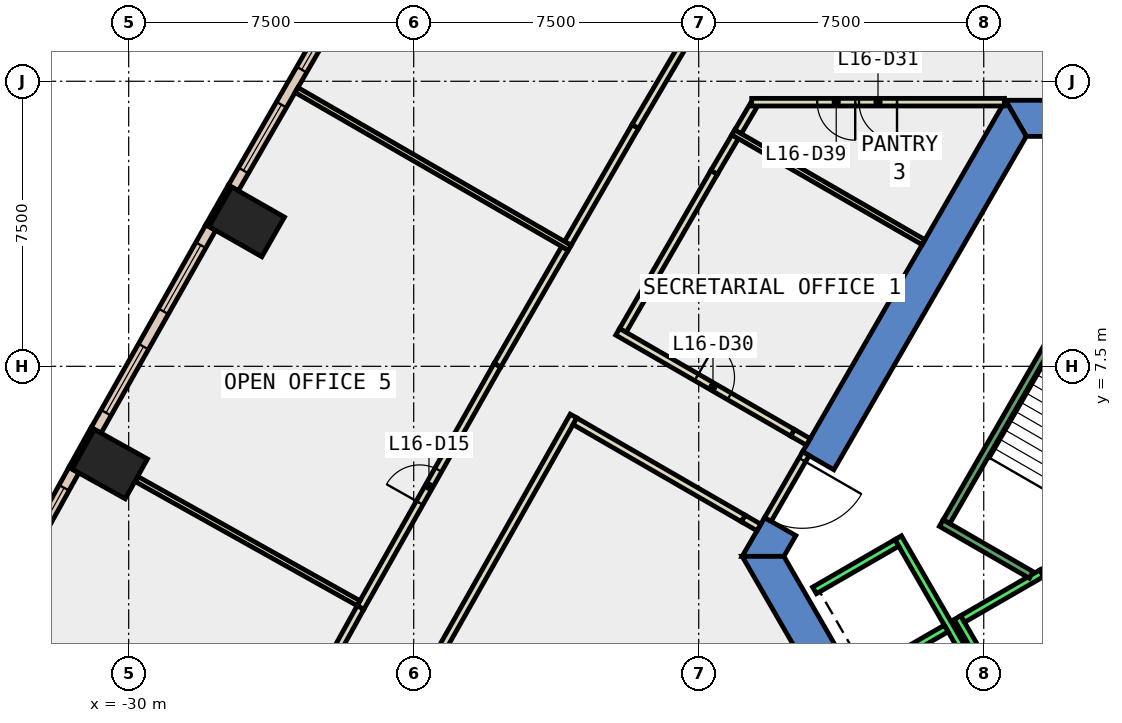
"""IFC4 building model, lengths in metres.
Left out: names, types, materials, properties, quantities, classifications, styles, units other than length and angle.
Written with IfcOpenShell. Run it as: python <this file> out.ifc"""

import sys

from ifc_helpers import new_model, si_unit, direction, frame, frame_2d, origin, origin_2d, place, context, subcontext, project, spatial, polyline, rectangle, outline, extrude, element, fill, save


model = new_model("IFC4")
c1 = context("Model", 3, precision=1e-05, world=origin(), true_north=direction((0.0, 1.0)))
c2 = subcontext(c1, "Body", "Model", "MODEL_VIEW")
j1 = project(units=[si_unit("LENGTHUNIT", "METRE"), si_unit("PLANEANGLEUNIT", "RADIAN")], contexts=[c1])
p1 = place(None, origin())
s1 = spatial("IfcSite", under=j1, at=p1, CompositionType="ELEMENT")
p2 = place(p1, origin())
s2 = spatial("IfcBuilding", under=s1, at=p2, CompositionType="ELEMENT")
p3 = place(p2, frame((0.0, 0.0, 77.0)))
s3 = spatial("IfcBuildingStorey", under=s2, at=p3, CompositionType="ELEMENT", Elevation=77.0)
for number, where, z_axis, x_axis in (
    (1, (-26.894, 11.301, -0.4), (0.0, 0.0, 1.0), (0.496, 0.869, 0.0)),
    (2, (-30.497, 4.928, -0.4), (0.0, 0.0, 1.0), (0.487, 0.873, 0.0)),
):
    element("IfcColumn", number, at=place(p3, frame(where, z_axis=z_axis, x_axis=x_axis)), inside=s3, PredefinedType="COLUMN", context=c2, shape_type="SweptSolid", body=[
        extrude(rectangle(XDim=1.2, YDim=1.6, at=origin_2d()), origin(), (0.0, 0.0, 1.0), 4.0),
    ])
p4 = place(p3, frame((0.0, 0.0, -0.4)))
e3 = element("IfcWall", 3, at=p4, inside=s3, PredefinedType="SHEAR", context=c2, shape_type="SweptSolid", body=[
    extrude(outline(polyline([(-4.55, 13.55), (-4.55, 14.5), (-6.928, 14.5), (-6.38, 13.55), (-4.55, 13.55)])), origin(), (0.0, 0.0, 1.0), 4.0),
])
p5 = place(p3, frame((0.0, 0.0, -0.4)))
e4 = element("IfcWall", 4, at=p5, inside=s3, PredefinedType="SHEAR", context=c2, shape_type="SweptSolid", body=[
    extrude(outline(polyline([(-12.267, 5.252), (-11.444, 4.777), (-6.38, 13.55), (-6.928, 14.5), (-12.267, 5.252)])), origin(), (0.0, 0.0, 1.0), 4.0),
])
p6 = place(p3, frame((0.0, 0.0, -0.4)))
e5 = element("IfcWall", 5, at=p6, inside=s3, PredefinedType="SHEAR", context=c2, shape_type="SweptSolid", body=[
    extrude(outline(polyline([(-12.444, 3.045), (-13.267, 3.52), (-13.856, 2.5), (-12.759, 2.5), (-12.444, 3.045)])), origin(), (0.0, 0.0, 1.0), 4.0),
])
p7 = place(p3, frame((0.0, 0.0, -0.4)))
e6 = element("IfcWall", 6, at=p7, inside=s3, PredefinedType="SHEAR", context=c2, shape_type="SweptSolid", body=[
    extrude(outline(polyline([(-13.856, 2.5), (-6.928, -9.5), (-6.38, -8.55), (-12.759, 2.5), (-13.856, 2.5)])), origin(), (0.0, 0.0, 1.0), 4.0),
])
p8 = place(p3, frame((-27.335, 12.243, 0.0), z_axis=(0.0, 0.0, 1.0), x_axis=(-0.495854054996, -0.868405870629, 0.0)))
e7 = element("IfcWall", 7, at=p8, inside=s3, PredefinedType="STANDARD", context=c2, shape_type="SweptSolid", body=[
    extrude(rectangle(XDim=1.2, YDim=0.1, at=frame_2d((0.6, 0.0))), origin(), (0.0, 0.0, 1.0), 3.6),
])
p9 = place(p3, frame((-30.947, 5.866, 0.0), z_axis=(0.0, 0.0, 1.0), x_axis=(-0.486817526853, -0.873503689488, 0.0)))
e8 = element("IfcWall", 8, at=p9, inside=s3, PredefinedType="STANDARD", context=c2, shape_type="SweptSolid", body=[
    extrude(rectangle(XDim=1.2, YDim=0.1, at=frame_2d((0.6, 0.0))), origin(), (0.0, 0.0, 1.0), 3.6),
])
p10 = place(p3, frame((-24.181, 17.5, 0.0), z_axis=(0.0, 0.0, 1.0), x_axis=(-0.499998239139, -0.866026420416, 0.0)))
e9 = element("IfcWall", 9, at=p10, inside=s3, PredefinedType="STANDARD", context=c2, shape_type="SweptSolid", body=[
    extrude(rectangle(XDim=6.13, YDim=0.3, at=frame_2d((3.065, 0.0))), origin(), (0.0, 0.0, 1.0), 3.6),
])
p11 = place(p10, frame((0.533, 0.0, 0.9)))
e10 = element("IfcOpeningElement", 10, at=p11, cuts=e9, PredefinedType="OPENING", context=c2, shape_type="SweptSolid", body=[
    extrude(rectangle(XDim=2.0, YDim=2.6, at=frame_2d((1.0, 1.3))), frame((0.0, 0.16, 0.0), z_axis=(0.0, -1.0, 0.0), x_axis=(1.0, 0.0, 0.0)), (0.0, 0.0, 1.0), 0.32),
])
p12 = place(p10, frame((3.598, 0.0, 0.9)))
e11 = element("IfcOpeningElement", 11, at=p12, cuts=e9, PredefinedType="OPENING", context=c2, shape_type="SweptSolid", body=[
    extrude(rectangle(XDim=2.0, YDim=2.6, at=frame_2d((1.0, 1.3))), frame((0.0, 0.16, 0.0), z_axis=(0.0, -1.0, 0.0), x_axis=(1.0, 0.0, 0.0)), (0.0, 0.0, 1.0), 0.32),
])
p13 = place(p3, frame((-27.84, 11.151, 0.0), z_axis=(0.0, 0.0, 1.0), x_axis=(-0.492097935349, -0.870539845168, 0.0)))
e12 = element("IfcWall", 12, at=p13, inside=s3, PredefinedType="STANDARD", context=c2, shape_type="SweptSolid", body=[
    extrude(rectangle(XDim=6.131, YDim=0.3, at=frame_2d((3.065, 0.0))), origin(), (0.0, 0.0, 1.0), 3.6),
])
p14 = place(p13, frame((0.533, 0.0, 0.9)))
e13 = element("IfcOpeningElement", 13, at=p14, cuts=e12, PredefinedType="OPENING", context=c2, shape_type="SweptSolid", body=[
    extrude(rectangle(XDim=2.0, YDim=2.6, at=frame_2d((1.0, 1.3))), frame((0.0, 0.16, 0.0), z_axis=(0.0, -1.0, 0.0), x_axis=(1.0, 0.0, 0.0)), (0.0, 0.0, 1.0), 0.32),
])
p15 = place(p13, frame((3.598, 0.0, 0.9)))
e14 = element("IfcOpeningElement", 14, at=p15, cuts=e12, PredefinedType="OPENING", context=c2, shape_type="SweptSolid", body=[
    extrude(rectangle(XDim=2.0, YDim=2.6, at=frame_2d((1.0, 1.3))), frame((0.0, 0.16, 0.0), z_axis=(0.0, -1.0, 0.0), x_axis=(1.0, 0.0, 0.0)), (0.0, 0.0, 1.0), 0.32),
])
p16 = place(p3, frame((-31.442, 4.769, 0.0), z_axis=(0.0, 0.0, 1.0), x_axis=(-0.484025698618, -0.875053782963, 0.0)))
e15 = element("IfcWall", 15, at=p16, inside=s3, PredefinedType="STANDARD", context=c2, shape_type="SweptSolid", body=[
    extrude(rectangle(XDim=6.13, YDim=0.3, at=frame_2d((3.065, 0.0))), origin(), (0.0, 0.0, 1.0), 3.6),
])
p17 = place(p16, frame((0.532, 0.0, 0.9)))
e16 = element("IfcOpeningElement", 16, at=p17, cuts=e15, PredefinedType="OPENING", context=c2, shape_type="SweptSolid", body=[
    extrude(rectangle(XDim=2.0, YDim=2.6, at=frame_2d((1.0, 1.3))), frame((0.0, 0.16, 0.0), z_axis=(0.0, -1.0, 0.0), x_axis=(1.0, 0.0, 0.0)), (0.0, 0.0, 1.0), 0.32),
])
p18 = place(p16, frame((3.597, 0.0, 0.9)))
e17 = element("IfcOpeningElement", 17, at=p18, cuts=e15, PredefinedType="OPENING", context=c2, shape_type="SweptSolid", body=[
    extrude(rectangle(XDim=2.0, YDim=2.6, at=frame_2d((1.0, 1.3))), frame((0.0, 0.16, 0.0), z_axis=(0.0, -1.0, 0.0), x_axis=(1.0, 0.0, 0.0)), (0.0, 0.0, 1.0), 0.32),
])
p19 = place(p3, frame((-14.042, 13.541, 0.0), z_axis=(0.0, 0.0, 1.0), x_axis=(-0.507733830316, -0.861513991501, 0.0)))
e18 = element("IfcWall", 18, at=p19, inside=s3, PredefinedType="PARTITIONING", context=c2, shape_type="SweptSolid", body=[
    extrude(rectangle(XDim=1.091, YDim=0.2, at=frame_2d((0.545, 0.0))), origin(), (0.0, 0.0, 1.0), 3.6),
])
p20 = place(p3, frame((-14.596, 12.601, 0.0), z_axis=(0.0, 0.0, 1.0), x_axis=(-0.500017431331, -0.866015339567, 0.0)))
e19 = element("IfcWall", 19, at=p20, inside=s3, PredefinedType="PARTITIONING", context=c2, shape_type="SweptSolid", body=[
    extrude(rectangle(XDim=4.8, YDim=0.2, at=frame_2d((2.4, 0.0))), origin(), (0.0, 0.0, 1.0), 3.6),
])
p21 = place(p3, frame((-17.133, 8.408, 0.0), z_axis=(0.0, 0.0, 1.0), x_axis=(0.866005140137, -0.500035096025, 0.0)))
e20 = element("IfcWall", 20, at=p21, inside=s3, PredefinedType="PARTITIONING", context=c2, shape_type="SweptSolid", body=[
    extrude(rectangle(XDim=5.317, YDim=0.2, at=frame_2d((2.659, 0.0))), origin(), (0.0, 0.0, 1.0), 3.6),
])
p22 = place(p21, frame((2.396, 0.0, 0.0)))
e21 = element("IfcOpeningElement", 21, at=p22, cuts=e20, PredefinedType="OPENING", context=c2, shape_type="SweptSolid", body=[
    extrude(rectangle(XDim=1.0, YDim=2.1, at=frame_2d((0.5, 1.05))), frame((0.0, 0.11, 0.0), z_axis=(0.0, -1.0, 0.0), x_axis=(1.0, 0.0, 0.0)), (0.0, 0.0, 1.0), 0.22),
])
p23 = place(p3, frame((-13.557, 14.364, 0.0), z_axis=(0.0, 0.0, 1.0), x_axis=(-0.507840899418, -0.861450881292, 0.0)))
e22 = element("IfcWall", 22, at=p23, inside=s3, PredefinedType="PARTITIONING", context=c2, shape_type="SweptSolid", body=[
    extrude(rectangle(XDim=0.806, YDim=0.2, at=frame_2d((0.403, 0.0))), origin(), (0.0, 0.0, 1.0), 3.6),
])
p24 = place(p3, frame((-13.417, 3.26, 0.0), z_axis=(0.0, 0.0, 1.0), x_axis=(-0.865929261247, 0.500166486798, 0.0)))
e23 = element("IfcWall", 23, at=p24, inside=s3, PredefinedType="PARTITIONING", context=c2, shape_type="SweptSolid", body=[
    extrude(rectangle(XDim=0.476, YDim=0.2, at=frame_2d((0.238, 0.0))), origin(), (0.0, 0.0, 1.0), 2.4),
])
p25 = place(p3, frame((-18.295, 6.192, 0.0), z_axis=(0.0, 0.0, 1.0), x_axis=(-0.492193980341, -0.870485545954, 0.0)))
e24 = element("IfcWall", 24, at=p25, inside=s3, PredefinedType="PARTITIONING", context=c2, shape_type="SweptSolid", body=[
    extrude(rectangle(XDim=7.06, YDim=0.2, at=frame_2d((3.53, 0.0))), origin(), (0.0, 0.0, 1.0), 3.6),
])
p26 = place(p3, frame((-18.445, 10.734, 0.0), z_axis=(0.0, 0.0, 1.0), x_axis=(0.499900903336, 0.866082609711, 0.0)))
e25 = element("IfcWall", 25, at=p26, inside=s3, PredefinedType="PARTITIONING", context=c2, shape_type="SweptSolid", body=[
    extrude(rectangle(XDim=3.553, YDim=0.2, at=frame_2d((1.776, 0.0))), origin(), (0.0, 0.0, 1.0), 3.6),
])
p27 = place(p3, frame((-16.669, 13.811, 0.0), z_axis=(0.0, 0.0, 1.0), x_axis=(0.507777955495, 0.861487984776, 0.0)))
e26 = element("IfcWall", 26, at=p27, inside=s3, PredefinedType="PARTITIONING", context=c2, shape_type="SweptSolid", body=[
    extrude(rectangle(XDim=7.178, YDim=0.2, at=frame_2d((3.589, 0.0))), origin(), (0.0, 0.0, 1.0), 3.6),
])
p28 = place(p27, frame((3.164, 0.0, 0.0)))
e27 = element("IfcOpeningElement", 27, at=p28, cuts=e26, PredefinedType="OPENING", context=c2, shape_type="SweptSolid", body=[
    extrude(rectangle(XDim=1.0, YDim=2.1, at=frame_2d((0.5, 1.05))), frame((0.0, 0.11, 0.0), z_axis=(0.0, -1.0, 0.0), x_axis=(1.0, 0.0, 0.0)), (0.0, 0.0, 1.0), 0.22),
])
p29 = place(p3, frame((-23.901, 1.152, 0.0), z_axis=(0.0, 0.0, 1.0), x_axis=(0.492063845089, 0.870559114797, 0.0)))
e28 = element("IfcWall", 28, at=p29, inside=s3, PredefinedType="PARTITIONING", context=c2, shape_type="SweptSolid", body=[
    extrude(rectangle(XDim=7.326, YDim=0.2, at=frame_2d((3.663, 0.0))), origin(), (0.0, 0.0, 1.0), 3.6),
])
p30 = place(p29, frame((3.163, 0.0, 0.0)))
e29 = element("IfcOpeningElement", 29, at=p30, cuts=e28, PredefinedType="OPENING", context=c2, shape_type="SweptSolid", body=[
    extrude(rectangle(XDim=1.0, YDim=2.1, at=frame_2d((0.5, 1.05))), frame((0.0, 0.11, 0.0), z_axis=(0.0, -1.0, 0.0), x_axis=(1.0, 0.0, 0.0)), (0.0, 0.0, 1.0), 0.22),
])
p31 = place(p3, frame((-20.296, 7.53, 0.0), z_axis=(0.0, 0.0, 1.0), x_axis=(0.500236350306, 0.865888903863, 0.0)))
e30 = element("IfcWall", 30, at=p31, inside=s3, PredefinedType="PARTITIONING", context=c2, shape_type="SweptSolid", body=[
    extrude(rectangle(XDim=3.55, YDim=0.2, at=frame_2d((1.775, 0.0))), origin(), (0.0, 0.0, 1.0), 3.6),
])
p32 = place(p3, frame((-27.375, -5.128, 0.0), z_axis=(0.0, 0.0, 1.0), x_axis=(0.484068035355, 0.875030363558, 0.0)))
e31 = element("IfcWall", 31, at=p32, inside=s3, PredefinedType="PARTITIONING", context=c2, shape_type="SweptSolid", body=[
    extrude(rectangle(XDim=7.177, YDim=0.2, at=frame_2d((3.588, 0.0))), origin(), (0.0, 0.0, 1.0), 3.6),
])
p33 = place(p32, frame((3.163, 0.0, 0.0)))
e32 = element("IfcOpeningElement", 32, at=p33, cuts=e31, PredefinedType="OPENING", context=c2, shape_type="SweptSolid", body=[
    extrude(rectangle(XDim=1.0, YDim=2.1, at=frame_2d((0.5, 1.05))), frame((0.0, 0.11, 0.0), z_axis=(0.0, -1.0, 0.0), x_axis=(1.0, 0.0, 0.0)), (0.0, 0.0, 1.0), 0.22),
])
p34 = place(p3, frame((-14.091, 13.655, 0.0), z_axis=(0.0, 0.0, 1.0), x_axis=(0.866035778077, -0.499982030767, 0.0)))
e33 = element("IfcWall", 33, at=p34, inside=s3, PredefinedType="PARTITIONING", context=c2, shape_type="SweptSolid", body=[
    extrude(rectangle(XDim=5.781, YDim=0.15, at=frame_2d((2.89, 0.0))), origin(), (0.0, 0.0, 1.0), 3.6),
])
p35 = place(p3, frame((-6.957, 14.45, 0.0), z_axis=(0.0, 0.0, 1.0), x_axis=(-1.0, 0.0, 0.0)))
e34 = element("IfcWall", 34, at=p35, inside=s3, PredefinedType="PARTITIONING", context=c2, shape_type="SweptSolid", body=[
    extrude(rectangle(XDim=6.649, YDim=0.2, at=frame_2d((3.324, 0.0))), origin(), (0.0, 0.0, 1.0), 3.6),
])
p36 = place(p35, frame((2.825, 0.0, 0.0)))
e35 = element("IfcOpeningElement", 35, at=p36, cuts=e34, PredefinedType="OPENING", context=c2, shape_type="SweptSolid", body=[
    extrude(rectangle(XDim=1.0, YDim=2.1, at=frame_2d((0.5, 1.05))), frame((0.0, 0.11, 0.0), z_axis=(0.0, -1.0, 0.0), x_axis=(1.0, 0.0, 0.0)), (0.0, 0.0, 1.0), 0.22),
])
p37 = place(p35, frame((3.925, 0.0, 0.0)))
e36 = element("IfcOpeningElement", 36, at=p37, cuts=e34, PredefinedType="OPENING", context=c2, shape_type="SweptSolid", body=[
    extrude(rectangle(XDim=1.0, YDim=2.1, at=frame_2d((0.5, 1.05))), frame((0.0, 0.11, 0.0), z_axis=(0.0, -1.0, 0.0), x_axis=(1.0, 0.0, 0.0)), (0.0, 0.0, 1.0), 0.22),
])
p38 = place(p3, frame((-18.396, 10.619, 0.0), z_axis=(0.0, 0.0, 1.0), x_axis=(-0.865966132161, 0.500102647413, 0.0)))
e37 = element("IfcWall", 37, at=p38, inside=s3, PredefinedType="PARTITIONING", context=c2, shape_type="SweptSolid", body=[
    extrude(rectangle(XDim=8.301, YDim=0.15, at=frame_2d((4.15, 0.0))), origin(), (0.0, 0.0, 1.0), 3.6),
])
p39 = place(p3, frame((-23.951, 1.266, 0.0), z_axis=(0.0, 0.0, 1.0), x_axis=(-0.872786908026, 0.488101437385, 0.0)))
e38 = element("IfcWall", 38, at=p39, inside=s3, PredefinedType="PARTITIONING", context=c2, shape_type="SweptSolid", body=[
    extrude(rectangle(XDim=6.681, YDim=0.15, at=frame_2d((3.34, 0.0))), origin(), (0.0, 0.0, 1.0), 3.6),
])
p40 = place(p3, frame((-12.18, 5.202, 0.0), z_axis=(0.0, 0.0, 1.0), x_axis=(-0.50002537861, -0.866010750942, 0.0)))
e39 = element("IfcWall", 39, at=p40, inside=s3, PredefinedType="PARTITIONING", context=c2, shape_type="SweptSolid", body=[
    extrude(rectangle(XDim=2.0, YDim=0.2, at=frame_2d((1.0, 0.0))), origin(), (0.0, 0.0, 1.0), 2.4),
])
p41 = place(p40, frame((0.19, 0.0, 0.0)))
e40 = element("IfcOpeningElement", 40, at=p41, cuts=e39, PredefinedType="OPENING", context=c2, shape_type="SweptSolid", body=[
    extrude(rectangle(XDim=1.8, YDim=2.1, at=frame_2d((0.9, 1.05))), frame((0.0, 0.11, 0.0), z_axis=(0.0, -1.0, 0.0), x_axis=(1.0, 0.0, 0.0)), (0.0, 0.0, 1.0), 0.22),
])
p42 = place(p3, frame((-12.528, 5.749, 0.0), z_axis=(0.0, 0.0, 1.0), x_axis=(0.866305462299, -0.499514610387, 0.0)))
e41 = element("IfcWall", 41, at=p42, inside=s3, PredefinedType="PARTITIONING", context=c2, shape_type="SweptSolid", body=[
    extrude(rectangle(XDim=0.475, YDim=0.2, at=frame_2d((0.237, 0.0))), origin(), (0.0, 0.0, 1.0), 2.4),
])
p43 = place(p3, frame((-13.829, 3.498, 0.0), z_axis=(0.0, 0.0, 1.0), x_axis=(-0.866040105854, 0.499974534403, 0.0)))
e42 = element("IfcWall", 42, at=p43, inside=s3, PredefinedType="PARTITIONING", context=c2, shape_type="SweptSolid", body=[
    extrude(rectangle(XDim=5.114, YDim=0.2, at=frame_2d((2.557, 0.0))), origin(), (0.0, 0.0, 1.0), 3.6),
])
p44 = place(p3, frame((-5.94, 2.188, 0.0), z_axis=(0.0, 0.0, 1.0), x_axis=(0.49994636267, -0.866056369097, 0.0)))
e43 = element("IfcWall", 43, at=p44, inside=s3, PredefinedType="STANDARD", context=c2, shape_type="SweptSolid", body=[
    extrude(rectangle(XDim=2.8, YDim=0.2, at=frame_2d((1.4, 0.0))), origin(), (0.0, 0.0, 1.0), 3.6),
])
p45 = place(p44, frame((1.225, 0.0, 0.0)))
e44 = element("IfcOpeningElement", 44, at=p45, cuts=e43, PredefinedType="OPENING", context=c2, shape_type="SweptSolid", body=[
    extrude(rectangle(XDim=1.1, YDim=2.1, at=frame_2d((0.55, 1.05))), frame((0.0, 0.11, 0.0), z_axis=(0.0, -1.0, 0.0), x_axis=(1.0, 0.0, 0.0)), (0.0, 0.0, 1.0), 0.22),
])
p46 = place(p3, frame((-8.192, 0.888, 0.0), z_axis=(0.0, 0.0, 1.0), x_axis=(0.49994636267, -0.866056369097, 0.0)))
e45 = element("IfcWall", 45, at=p46, inside=s3, PredefinedType="STANDARD", context=c2, shape_type="SweptSolid", body=[
    extrude(rectangle(XDim=2.8, YDim=0.2, at=frame_2d((1.4, 0.0))), origin(), (0.0, 0.0, 1.0), 3.6),
])
p47 = place(p3, frame((-5.977, 2.052, 0.0), z_axis=(0.0, 0.0, 1.0), x_axis=(-0.865973769406, -0.500089422704, 0.0)))
e46 = element("IfcWall", 46, at=p47, inside=s3, PredefinedType="STANDARD", context=c2, shape_type="SweptSolid", body=[
    extrude(rectangle(XDim=2.399, YDim=0.2, at=frame_2d((1.2, 0.0))), origin(), (0.0, 0.0, 1.0), 3.6),
])
p48 = place(p3, frame((-9.751, 2.99, 0.0), z_axis=(0.0, 0.0, 1.0), x_axis=(0.50000090737, -0.866024879913, 0.0)))
e47 = element("IfcWall", 47, at=p48, inside=s3, PredefinedType="STANDARD", context=c2, shape_type="SweptSolid", body=[
    extrude(rectangle(XDim=10.6, YDim=0.2, at=frame_2d((5.3, 0.0))), origin(), (0.0, 0.0, 1.0), 3.6),
])
p49 = place(p3, frame((-9.788, 2.853, 0.0), z_axis=(0.0, 0.0, 1.0), x_axis=(-0.865998541277, -0.500046524342, 0.0)))
e48 = element("IfcWall", 48, at=p49, inside=s3, PredefinedType="STANDARD", context=c2, shape_type="SweptSolid", body=[
    extrude(rectangle(XDim=2.5, YDim=0.2, at=frame_2d((1.25, 0.0))), origin(), (0.0, 0.0, 1.0), 3.6),
])
p50 = place(p3, frame((-8.488, 0.602, 0.0), z_axis=(0.0, 0.0, 1.0), x_axis=(-0.866022959057, -0.500004234368, 0.0)))
e49 = element("IfcWall", 49, at=p50, inside=s3, PredefinedType="STANDARD", context=c2, shape_type="SweptSolid", body=[
    extrude(rectangle(XDim=2.5, YDim=0.2, at=frame_2d((1.25, 0.0))), origin(), (0.0, 0.0, 1.0), 3.6),
])
p51 = place(p3, frame((-6.25, 2.01, 0.0), z_axis=(0.0, 0.0, 1.0), x_axis=(-0.86611865017, 0.499838457731, 0.0)))
e50 = element("IfcWall", 50, at=p51, inside=s3, PredefinedType="STANDARD", context=c2, shape_type="SweptSolid", body=[
    extrude(rectangle(XDim=2.733, YDim=0.2, at=frame_2d((1.366, 0.0))), origin(), (0.0, 0.0, 1.0), 3.6),
])
p52 = place(p3, frame((-5.03, 9.388, 0.0), z_axis=(0.0, 0.0, 1.0), x_axis=(-0.499978703459, -0.866037698999, 0.0)))
e51 = element("IfcWall", 51, at=p52, inside=s3, PredefinedType="STANDARD", context=c2, shape_type="SweptSolid", body=[
    extrude(rectangle(XDim=6.9, YDim=0.2, at=frame_2d((3.45, 0.0))), origin(), (0.0, 0.0, 1.0), 3.6),
])
p53 = place(p11, origin())
e52 = element("IfcWindow", 52, at=p53, inside=s3, PartitioningType="SINGLE_PANEL", PredefinedType="WINDOW", context=c2, shape_type="SweptSolid", body=[
    extrude(rectangle(XDim=2.0, YDim=2.6, at=frame_2d((1.0, 1.3))), frame((0.0, 0.03, 0.0), z_axis=(0.0, -1.0, 0.0), x_axis=(1.0, 0.0, 0.0)), (0.0, 0.0, 1.0), 0.06),
])
fill(e10, e52)
p54 = place(p12, origin())
e53 = element("IfcWindow", 53, at=p54, inside=s3, PartitioningType="SINGLE_PANEL", PredefinedType="WINDOW", context=c2, shape_type="SweptSolid", body=[
    extrude(rectangle(XDim=2.0, YDim=2.6, at=frame_2d((1.0, 1.3))), frame((0.0, 0.03, 0.0), z_axis=(0.0, -1.0, 0.0), x_axis=(1.0, 0.0, 0.0)), (0.0, 0.0, 1.0), 0.06),
])
fill(e11, e53)
p55 = place(p14, origin())
e54 = element("IfcWindow", 54, at=p55, inside=s3, PartitioningType="SINGLE_PANEL", PredefinedType="WINDOW", context=c2, shape_type="SweptSolid", body=[
    extrude(rectangle(XDim=2.0, YDim=2.6, at=frame_2d((1.0, 1.3))), frame((0.0, 0.03, 0.0), z_axis=(0.0, -1.0, 0.0), x_axis=(1.0, 0.0, 0.0)), (0.0, 0.0, 1.0), 0.06),
])
fill(e13, e54)
p56 = place(p15, origin())
e55 = element("IfcWindow", 55, at=p56, inside=s3, PartitioningType="SINGLE_PANEL", PredefinedType="WINDOW", context=c2, shape_type="SweptSolid", body=[
    extrude(rectangle(XDim=2.0, YDim=2.6, at=frame_2d((1.0, 1.3))), frame((0.0, 0.03, 0.0), z_axis=(0.0, -1.0, 0.0), x_axis=(1.0, 0.0, 0.0)), (0.0, 0.0, 1.0), 0.06),
])
fill(e14, e55)
p57 = place(p17, origin())
e56 = element("IfcWindow", 56, at=p57, inside=s3, PartitioningType="SINGLE_PANEL", PredefinedType="WINDOW", context=c2, shape_type="SweptSolid", body=[
    extrude(rectangle(XDim=2.0, YDim=2.6, at=frame_2d((1.0, 1.3))), frame((0.0, 0.03, 0.0), z_axis=(0.0, -1.0, 0.0), x_axis=(1.0, 0.0, 0.0)), (0.0, 0.0, 1.0), 0.06),
])
fill(e16, e56)
p58 = place(p30, origin())
e57 = element("IfcDoor", 57, at=p58, inside=s3, OperationType="SINGLE_SWING_LEFT", PredefinedType="DOOR", context=c2, shape_type="SweptSolid", body=[
    extrude(rectangle(XDim=1.0, YDim=2.1, at=frame_2d((0.5, 1.05))), frame((0.0, 0.025, 0.0), z_axis=(0.0, -1.0, 0.0), x_axis=(1.0, 0.0, 0.0)), (0.0, 0.0, 1.0), 0.05),
])
fill(e29, e57)
p59 = place(p22, origin())
e58 = element("IfcDoor", 58, at=p59, inside=s3, OperationType="SINGLE_SWING_LEFT", PredefinedType="DOOR", context=c2, shape_type="SweptSolid", body=[
    extrude(rectangle(XDim=1.0, YDim=2.1, at=frame_2d((0.5, 1.05))), frame((0.0, 0.025, 0.0), z_axis=(0.0, -1.0, 0.0), x_axis=(1.0, 0.0, 0.0)), (0.0, 0.0, 1.0), 0.05),
])
fill(e21, e58)
p60 = place(p36, origin())
e59 = element("IfcDoor", 59, at=p60, inside=s3, OperationType="SINGLE_SWING_LEFT", PredefinedType="DOOR", context=c2, shape_type="SweptSolid", body=[
    extrude(rectangle(XDim=1.0, YDim=2.1, at=frame_2d((0.5, 1.05))), frame((0.0, 0.025, 0.0), z_axis=(0.0, -1.0, 0.0), x_axis=(1.0, 0.0, 0.0)), (0.0, 0.0, 1.0), 0.05),
])
fill(e35, e59)
p61 = place(p37, origin())
e60 = element("IfcDoor", 60, at=p61, inside=s3, OperationType="SINGLE_SWING_RIGHT", PredefinedType="DOOR", context=c2, shape_type="SweptSolid", body=[
    extrude(rectangle(XDim=1.0, YDim=2.1, at=frame_2d((0.5, 1.05))), frame((0.0, 0.025, 0.0), z_axis=(0.0, -1.0, 0.0), x_axis=(1.0, 0.0, 0.0)), (0.0, 0.0, 1.0), 0.05),
])
fill(e36, e60)
p62 = place(p41, origin())
e61 = element("IfcDoor", 61, at=p62, inside=s3, OperationType="DOUBLE_DOOR_SINGLE_SWING", PredefinedType="DOOR", context=c2, shape_type="SweptSolid", body=[
    extrude(rectangle(XDim=1.8, YDim=2.1, at=frame_2d((0.9, 1.05))), frame((0.0, 0.025, 0.0), z_axis=(0.0, -1.0, 0.0), x_axis=(1.0, 0.0, 0.0)), (0.0, 0.0, 1.0), 0.05),
])
fill(e40, e61)
save(model, sys.argv[1])
